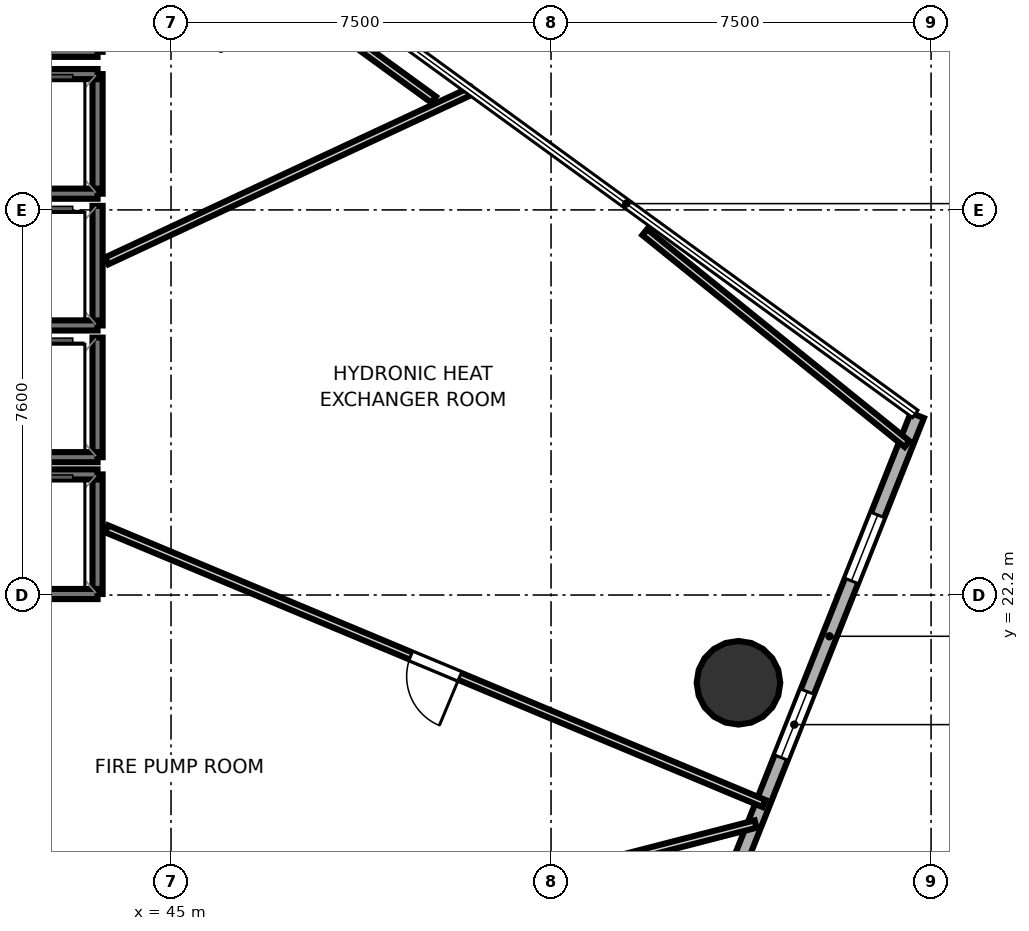
"""IFC4 building model, lengths in metres.
Left out: names, types, materials, properties, quantities, classifications, styles, units other than length and angle.
Written with IfcOpenShell. Run it as: python <this file> out.ifc"""

import sys

from ifc_helpers import new_model, si_unit, direction, frame, frame_2d, origin, origin_2d, place, context, subcontext, project, spatial, rectangle, hollow_circle, extrude, element, fill, save


model = new_model("IFC4")
c1 = context("Model", 3, precision=1e-05, world=origin(), true_north=direction((0.0, 1.0)))
c2 = subcontext(c1, "Body", "Model", "MODEL_VIEW")
j1 = project(units=[si_unit("LENGTHUNIT", "METRE"), si_unit("PLANEANGLEUNIT", "RADIAN")], contexts=[c1])
p1 = place(None, origin())
s1 = spatial("IfcSite", under=j1, at=p1, CompositionType="ELEMENT")
p2 = place(p1, origin())
s2 = spatial("IfcBuilding", under=s1, at=p2, CompositionType="ELEMENT")
p3 = place(p2, frame((0.0, 0.0, 93.2)))
s3 = spatial("IfcBuildingStorey", under=s2, at=p3, CompositionType="ELEMENT", Elevation=93.2)
p4 = place(p3, frame((56.199, 20.468, 0.0), z_axis=(0.0, 0.0, 1.0), x_axis=(1.0, 0.0, 0.0)))
e1 = element("IfcColumn", 1, at=p4, inside=s3, PredefinedType="COLUMN", context=c2, shape_type="SweptSolid", body=[
    extrude(hollow_circle(Radius=0.825, WallThickness=0.04, at=origin_2d()), origin(), (0.0, 0.0, 1.0), 4.6),
])
p5 = place(p3, frame((56.259, 17.027, 0.0), z_axis=(0.0, 0.0, 1.0), x_axis=(0.369797409366, 0.929112413019, 0.0)))
e2 = element("IfcWall", 2, at=p5, inside=s3, PredefinedType="SOLIDWALL", context=c2, shape_type="SweptSolid", body=[
    extrude(rectangle(XDim=9.382, YDim=0.28, at=frame_2d((4.691, 0.0))), origin(), (0.0, 0.0, 1.0), 4.42),
])
p6 = place(p5, frame((2.115, 0.0, 1.0)))
e3 = element("IfcOpeningElement", 3, at=p6, cuts=e2, PredefinedType="OPENING", context=c2, shape_type="SweptSolid", body=[
    extrude(rectangle(XDim=1.4, YDim=1.5, at=frame_2d((0.7, 0.75))), frame((0.0, 0.15, 0.0), z_axis=(0.0, -1.0, 0.0), x_axis=(1.0, 0.0, 0.0)), (0.0, 0.0, 1.0), 0.3),
])
p7 = place(p5, frame((5.867, 0.0, 1.0)))
e4 = element("IfcOpeningElement", 4, at=p7, cuts=e2, PredefinedType="OPENING", context=c2, shape_type="SweptSolid", body=[
    extrude(rectangle(XDim=1.4, YDim=1.5, at=frame_2d((0.7, 0.75))), frame((0.0, 0.15, 0.0), z_axis=(0.0, -1.0, 0.0), x_axis=(1.0, 0.0, 0.0)), (0.0, 0.0, 1.0), 0.3),
])
p8 = place(p3, frame((43.55, 30.12, 0.0), z_axis=(0.0, 0.0, 1.0), x_axis=(0.0, 1.0, 0.0)))
e5 = element("IfcWall", 5, at=p8, inside=s3, PredefinedType="SOLIDWALL", context=c2, shape_type="SweptSolid", body=[
    extrude(rectangle(XDim=2.36, YDim=0.2, at=frame_2d((1.18, 0.0))), origin(), (0.0, 0.0, 1.0), 4.42),
])
for number, where, z_axis, x_axis in (
    (6, (41.45, 32.48, 0.0), (0.0, 0.0, 1.0), (1.0, 0.0, 0.0)),
    (7, (41.45, 30.12, 0.0), (0.0, 0.0, 1.0), (1.0, 0.0, 0.0)),
):
    element("IfcWall", number, at=place(p3, frame(where, z_axis=z_axis, x_axis=x_axis)), inside=s3, PredefinedType="SOLIDWALL", context=c2, shape_type="SweptSolid", body=[
        extrude(rectangle(XDim=2.1, YDim=0.2, at=frame_2d((1.05, 0.0))), origin(), (0.0, 0.0, 1.0), 4.42),
    ])
p9 = place(p3, frame((43.55, 27.52, 0.0), z_axis=(0.0, 0.0, 1.0), x_axis=(0.0, 1.0, 0.0)))
e8 = element("IfcWall", 8, at=p9, inside=s3, PredefinedType="SOLIDWALL", context=c2, shape_type="SweptSolid", body=[
    extrude(rectangle(XDim=2.36, YDim=0.2, at=frame_2d((1.18, 0.0))), origin(), (0.0, 0.0, 1.0), 4.42),
])
p10 = place(p3, frame((41.45, 27.52, 0.0), z_axis=(0.0, 0.0, 1.0), x_axis=(1.0, 0.0, 0.0)))
e9 = element("IfcWall", 9, at=p10, inside=s3, PredefinedType="SOLIDWALL", context=c2, shape_type="SweptSolid", body=[
    extrude(rectangle(XDim=2.1, YDim=0.2, at=frame_2d((1.05, 0.0))), origin(), (0.0, 0.0, 1.0), 4.42),
])
p11 = place(p3, frame((43.55, 24.92, 0.0), z_axis=(0.0, 0.0, 1.0), x_axis=(0.0, 1.0, 0.0)))
e10 = element("IfcWall", 10, at=p11, inside=s3, PredefinedType="SOLIDWALL", context=c2, shape_type="SweptSolid", body=[
    extrude(rectangle(XDim=2.36, YDim=0.2, at=frame_2d((1.18, 0.0))), origin(), (0.0, 0.0, 1.0), 4.42),
])
p12 = place(p3, frame((41.45, 24.92, 0.0), z_axis=(0.0, 0.0, 1.0), x_axis=(1.0, 0.0, 0.0)))
e11 = element("IfcWall", 11, at=p12, inside=s3, PredefinedType="SOLIDWALL", context=c2, shape_type="SweptSolid", body=[
    extrude(rectangle(XDim=2.1, YDim=0.2, at=frame_2d((1.05, 0.0))), origin(), (0.0, 0.0, 1.0), 4.42),
])
p13 = place(p3, frame((43.55, 22.22, 0.0), z_axis=(0.0, 0.0, 1.0), x_axis=(0.0, 1.0, 0.0)))
e12 = element("IfcWall", 12, at=p13, inside=s3, PredefinedType="SOLIDWALL", context=c2, shape_type="SweptSolid", body=[
    extrude(rectangle(XDim=2.36, YDim=0.2, at=frame_2d((1.18, 0.0))), origin(), (0.0, 0.0, 1.0), 4.42),
])
for number, where, z_axis, x_axis in (
    (13, (41.45, 24.58, 0.0), (0.0, 0.0, 1.0), (1.0, 0.0, 0.0)),
    (14, (41.45, 22.22, 0.0), (0.0, 0.0, 1.0), (1.0, 0.0, 0.0)),
    (15, (41.45, 32.92, 0.0), (0.0, 0.0, 1.0), (1.0, 0.0, 0.0)),
):
    element("IfcWall", number, at=place(p3, frame(where, z_axis=z_axis, x_axis=x_axis)), inside=s3, PredefinedType="SOLIDWALL", context=c2, shape_type="SweptSolid", body=[
        extrude(rectangle(XDim=2.1, YDim=0.2, at=frame_2d((1.05, 0.0))), origin(), (0.0, 0.0, 1.0), 4.42),
    ])
p14 = place(p3, frame((43.733, 28.795, 0.0), z_axis=(0.0, 0.0, 1.0), x_axis=(0.906319515089, 0.422593109941, 0.0)))
e16 = element("IfcWall", 16, at=p14, inside=s3, PredefinedType="PARTITIONING", context=c2, shape_type="SweptSolid", body=[
    extrude(rectangle(XDim=7.955, YDim=0.15, at=frame_2d((3.978, 0.0))), origin(), (0.0, 0.0, 1.0), 2.94),
])
p15 = place(p3, frame((54.349, 29.361, 0.0), z_axis=(0.0, 0.0, 1.0), x_axis=(0.777935661649, -0.628343939522, 0.0)))
e17 = element("IfcWall", 17, at=p15, inside=s3, PredefinedType="PARTITIONING", context=c2, shape_type="SweptSolid", body=[
    extrude(rectangle(XDim=6.654, YDim=0.15, at=frame_2d((3.327, 0.0))), origin(), (0.0, 0.0, 1.0), 2.94),
])
p16 = place(p3, frame((56.702, 18.086, 0.0), z_axis=(0.0, 0.0, 1.0), x_axis=(-0.922688059658, 0.385547331161, 0.0)))
e18 = element("IfcWall", 18, at=p16, inside=s3, PredefinedType="PARTITIONING", context=c2, shape_type="SweptSolid", body=[
    extrude(rectangle(XDim=14.06, YDim=0.15, at=frame_2d((7.03, 0.0))), origin(), (0.0, 0.0, 1.0), 2.94),
])
p17 = place(p16, frame((6.505, 0.0, 0.0)))
e19 = element("IfcOpeningElement", 19, at=p17, cuts=e18, PredefinedType="OPENING", context=c2, shape_type="SweptSolid", body=[
    extrude(rectangle(XDim=1.05, YDim=2.15, at=frame_2d((0.525, 1.075))), frame((0.0, 0.085, 0.0), z_axis=(0.0, -1.0, 0.0), x_axis=(1.0, 0.0, 0.0)), (0.0, 0.0, 1.0), 0.17),
])
p18 = place(p3, frame((56.537, 17.68, 0.0), z_axis=(0.0, 0.0, 1.0), x_axis=(-0.968269668655, -0.249907680481, 0.0)))
e20 = element("IfcWall", 20, at=p18, inside=s3, PredefinedType="PARTITIONING", context=c2, shape_type="SweptSolid", body=[
    extrude(rectangle(XDim=10.704, YDim=0.15, at=frame_2d((5.352, 0.0))), origin(), (0.0, 0.0, 1.0), 2.94),
])
p19 = place(p3, frame((46.886, 34.374, 0.0), z_axis=(0.0, 0.0, 1.0), x_axis=(0.808707605228, -0.58821085441, 0.0)))
e21 = element("IfcWall", 21, at=p19, inside=s3, PredefinedType="PARTITIONING", context=c2, shape_type="SweptSolid", body=[
    extrude(rectangle(XDim=4.078, YDim=0.15, at=frame_2d((2.039, 0.0))), origin(), (0.0, 0.0, 1.0), 2.94),
])
p20 = place(p17, origin())
e22 = element("IfcDoor", 22, at=p20, inside=s3, OperationType="SINGLE_SWING_LEFT", PredefinedType="DOOR", context=c2, shape_type="SweptSolid", body=[
    extrude(rectangle(XDim=1.05, YDim=2.15, at=frame_2d((0.525, 1.075))), frame((0.0, 0.025, 0.0), z_axis=(0.0, -1.0, 0.0), x_axis=(1.0, 0.0, 0.0)), (0.0, 0.0, 1.0), 0.05),
])
fill(e19, e22)
p21 = place(p6, origin())
e23 = element("IfcWindow", 23, at=p21, inside=s3, PartitioningType="SINGLE_PANEL", PredefinedType="WINDOW", context=c2, shape_type="SweptSolid", body=[
    extrude(rectangle(XDim=1.4, YDim=1.5, at=frame_2d((0.7, 0.75))), frame((0.0, 0.03, 0.0), z_axis=(0.0, -1.0, 0.0), x_axis=(1.0, 0.0, 0.0)), (0.0, 0.0, 1.0), 0.06),
])
fill(e3, e23)
p22 = place(p7, origin())
e24 = element("IfcWindow", 24, at=p22, inside=s3, PartitioningType="SINGLE_PANEL", PredefinedType="WINDOW", context=c2, shape_type="SweptSolid", body=[
    extrude(rectangle(XDim=1.4, YDim=1.5, at=frame_2d((0.7, 0.75))), frame((0.0, 0.03, 0.0), z_axis=(0.0, -1.0, 0.0), x_axis=(1.0, 0.0, 0.0)), (0.0, 0.0, 1.0), 0.06),
])
fill(e4, e24)
save(model, sys.argv[1])
